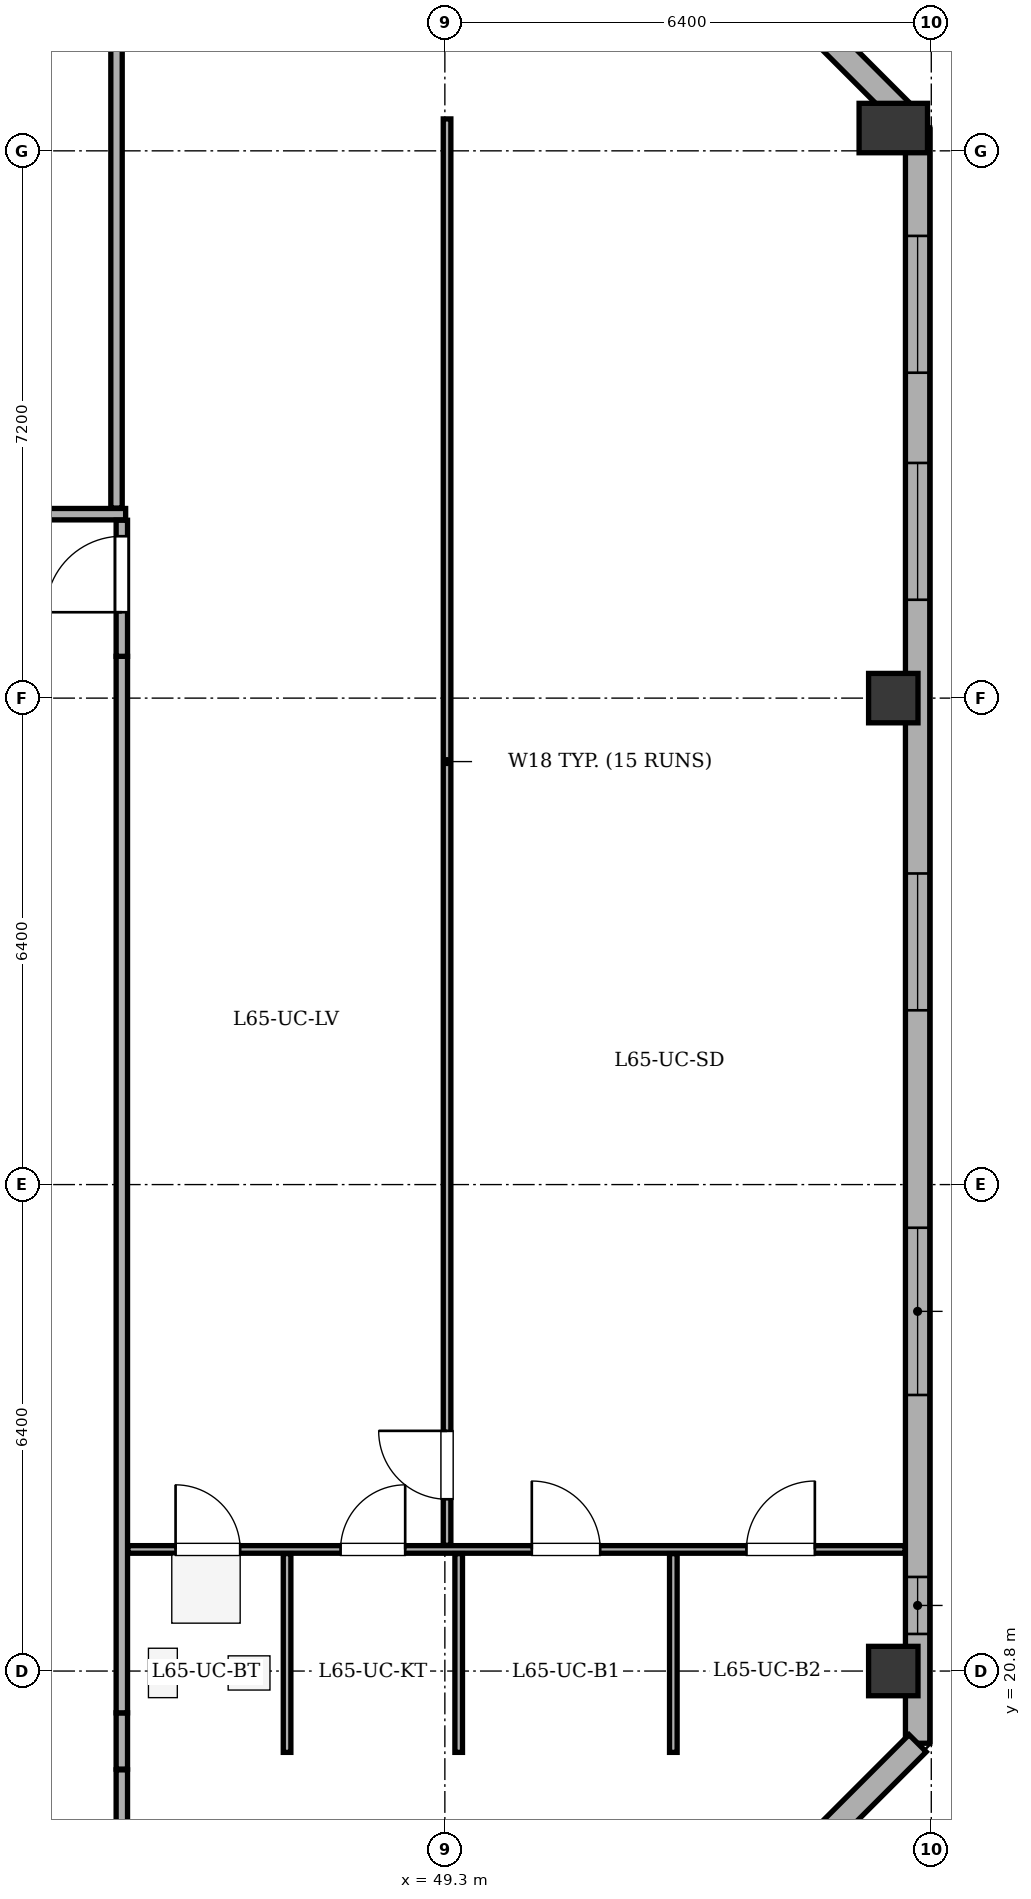
"""IFC4 building model, lengths in metres.
Left out: names, types, materials, properties, quantities, classifications, styles, units other than length and angle.
Written with IfcOpenShell. Run it as: python <this file> out.ifc"""

import sys

from ifc_helpers import new_model, si_unit, direction, frame, frame_2d, origin, origin_2d, place, context, subcontext, project, spatial, rectangle, extrude, element, fill, save


model = new_model("IFC4")
c1 = context("Model", 3, precision=1e-05, world=origin(), true_north=direction((0.0, 1.0)))
c2 = subcontext(c1, "Body", "Model", "MODEL_VIEW")
j1 = project(units=[si_unit("LENGTHUNIT", "METRE"), si_unit("PLANEANGLEUNIT", "RADIAN")], contexts=[c1])
p1 = place(None, origin())
s1 = spatial("IfcSite", under=j1, at=p1, CompositionType="ELEMENT")
p2 = place(p1, origin())
s2 = spatial("IfcBuilding", under=s1, at=p2, CompositionType="ELEMENT")
p3 = place(p2, frame((0.0, 0.0, 248.3)))
s3 = spatial("IfcBuildingStorey", under=s2, at=p3, CompositionType="ELEMENT", Elevation=248.3)
for number, where, z_axis, x_axis in (
    (1, (55.2, 20.8, 0.0), (0.0, 0.0, 1.0), (1.0, 0.0, 0.0)),
    (2, (55.2, 33.6, 0.0), (0.0, 0.0, 1.0), (1.0, 0.0, 0.0)),
):
    element("IfcColumn", number, at=place(p3, frame(where, z_axis=z_axis, x_axis=x_axis)), inside=s3, PredefinedType="COLUMN", context=c2, shape_type="SweptSolid", body=[
        extrude(rectangle(XDim=0.65, YDim=0.65, at=origin_2d()), origin(), (0.0, 0.0, 1.0), 3.4),
    ])
p4 = place(p3, frame((55.2, 41.1, 0.0), z_axis=(0.0, 0.0, 1.0), x_axis=(1.0, 0.0, 0.0)))
e3 = element("IfcColumn", 3, at=p4, inside=s3, PredefinedType="COLUMN", context=c2, shape_type="SweptSolid", body=[
    extrude(rectangle(XDim=0.65, YDim=0.9, at=origin_2d()), origin(), (0.0, 0.0, 1.0), 3.4),
])
p5 = place(p3, frame((51.7, 44.92, 0.0), z_axis=(0.0, 0.0, 1.0), x_axis=(0.70712937715, -0.707084184501, 0.0)))
e4 = element("IfcWall", 4, at=p5, inside=s3, PredefinedType="STANDARD", context=c2, shape_type="SweptSolid", body=[
    extrude(rectangle(XDim=5.402, YDim=0.32, at=frame_2d((2.701, 0.0))), origin(), (0.0, 0.0, 1.0), 2.725),
])
p6 = place(p5, frame((2.001, 0.0, 0.75)))
e5 = element("IfcOpeningElement", 5, at=p6, cuts=e4, PredefinedType="OPENING", context=c2, shape_type="SweptSolid", body=[
    extrude(rectangle(XDim=1.4, YDim=1.65, at=frame_2d((0.7, 0.825))), frame((0.0, 0.17, 0.0), z_axis=(0.0, -1.0, 0.0), x_axis=(1.0, 0.0, 0.0)), (0.0, 0.0, 1.0), 0.34),
])
p7 = place(p3, frame((55.52, 41.1, 0.0), z_axis=(0.0, 0.0, 1.0), x_axis=(0.0, -1.0, 0.0)))
e6 = element("IfcWall", 6, at=p7, inside=s3, PredefinedType="STANDARD", context=c2, shape_type="SweptSolid", body=[
    extrude(rectangle(XDim=21.25, YDim=0.32, at=frame_2d((10.625, 0.0))), origin(), (0.0, 0.0, 1.0), 2.725),
])
p8 = place(p7, frame((1.419, 0.0, 0.75)))
e7 = element("IfcOpeningElement", 7, at=p8, cuts=e6, PredefinedType="OPENING", context=c2, shape_type="SweptSolid", body=[
    extrude(rectangle(XDim=1.8, YDim=1.7, at=frame_2d((0.9, 0.85))), frame((0.0, 0.17, 0.0), z_axis=(0.0, -1.0, 0.0), x_axis=(1.0, 0.0, 0.0)), (0.0, 0.0, 1.0), 0.34),
])
p9 = place(p7, frame((4.406, 0.0, 0.75)))
e8 = element("IfcOpeningElement", 8, at=p9, cuts=e6, PredefinedType="OPENING", context=c2, shape_type="SweptSolid", body=[
    extrude(rectangle(XDim=1.8, YDim=1.7, at=frame_2d((0.9, 0.85))), frame((0.0, 0.17, 0.0), z_axis=(0.0, -1.0, 0.0), x_axis=(1.0, 0.0, 0.0)), (0.0, 0.0, 1.0), 0.34),
])
p10 = place(p7, frame((9.807, 0.0, 0.75)))
e9 = element("IfcOpeningElement", 9, at=p10, cuts=e6, PredefinedType="OPENING", context=c2, shape_type="SweptSolid", body=[
    extrude(rectangle(XDim=1.8, YDim=1.7, at=frame_2d((0.9, 0.85))), frame((0.0, 0.17, 0.0), z_axis=(0.0, -1.0, 0.0), x_axis=(1.0, 0.0, 0.0)), (0.0, 0.0, 1.0), 0.34),
])
p11 = place(p7, frame((14.468, 0.0, 0.75)))
e10 = element("IfcOpeningElement", 10, at=p11, cuts=e6, PredefinedType="OPENING", context=c2, shape_type="SweptSolid", body=[
    extrude(rectangle(XDim=2.2, YDim=1.7, at=frame_2d((1.1, 0.85))), frame((0.0, 0.17, 0.0), z_axis=(0.0, -1.0, 0.0), x_axis=(1.0, 0.0, 0.0)), (0.0, 0.0, 1.0), 0.34),
])
p12 = place(p7, frame((19.062, 0.0, 0.75)))
e11 = element("IfcOpeningElement", 11, at=p12, cuts=e6, PredefinedType="OPENING", context=c2, shape_type="SweptSolid", body=[
    extrude(rectangle(XDim=0.75, YDim=1.45, at=frame_2d((0.375, 0.725))), frame((0.0, 0.17, 0.0), z_axis=(0.0, -1.0, 0.0), x_axis=(1.0, 0.0, 0.0)), (0.0, 0.0, 1.0), 0.34),
])
p13 = place(p3, frame((55.52, 19.85, 0.0), z_axis=(0.0, 0.0, 1.0), x_axis=(-0.707106781187, -0.707106781187, 0.0)))
e12 = element("IfcWall", 12, at=p13, inside=s3, PredefinedType="STANDARD", context=c2, shape_type="SweptSolid", body=[
    extrude(rectangle(XDim=5.402, YDim=0.32, at=frame_2d((2.701, 0.0))), origin(), (0.0, 0.0, 1.0), 2.725),
])
p14 = place(p13, frame((2.001, 0.0, 0.75)))
e13 = element("IfcOpeningElement", 13, at=p14, cuts=e12, PredefinedType="OPENING", context=c2, shape_type="SweptSolid", body=[
    extrude(rectangle(XDim=1.4, YDim=1.65, at=frame_2d((0.7, 0.825))), frame((0.0, 0.17, 0.0), z_axis=(0.0, -1.0, 0.0), x_axis=(1.0, 0.0, 0.0)), (0.0, 0.0, 1.0), 0.34),
])
p15 = place(p3, frame((14.58, 36.02, 0.0), z_axis=(0.0, 0.0, 1.0), x_axis=(1.0, 0.0, 0.0)))
e14 = element("IfcWall", 14, at=p15, inside=s3, PredefinedType="PARTITIONING", context=c2, shape_type="SweptSolid", body=[
    extrude(rectangle(XDim=30.52, YDim=0.15, at=frame_2d((15.26, 0.0))), origin(), (0.0, 0.0, 1.0), 3.1),
])
p16 = place(p15, frame((6.585, 0.0, 0.0)))
e15 = element("IfcOpeningElement", 15, at=p16, cuts=e14, PredefinedType="OPENING", context=c2, shape_type="SweptSolid", body=[
    extrude(rectangle(XDim=1.0, YDim=2.1, at=frame_2d((0.5, 1.05))), frame((0.0, 0.085, 0.0), z_axis=(0.0, -1.0, 0.0), x_axis=(1.0, 0.0, 0.0)), (0.0, 0.0, 1.0), 0.17),
])
p17 = place(p15, frame((21.724, 0.0, 0.0)))
e16 = element("IfcOpeningElement", 16, at=p17, cuts=e14, PredefinedType="OPENING", context=c2, shape_type="SweptSolid", body=[
    extrude(rectangle(XDim=1.0, YDim=2.1, at=frame_2d((0.5, 1.05))), frame((0.0, 0.085, 0.0), z_axis=(0.0, -1.0, 0.0), x_axis=(1.0, 0.0, 0.0)), (0.0, 0.0, 1.0), 0.17),
])
p18 = place(p3, frame((44.98, 36.1, 0.0), z_axis=(0.0, 0.0, 1.0), x_axis=(0.0, 1.0, 0.0)))
e17 = element("IfcWall", 17, at=p18, inside=s3, PredefinedType="PARTITIONING", context=c2, shape_type="SweptSolid", body=[
    extrude(rectangle(XDim=8.655, YDim=0.15, at=frame_2d((4.327, 0.0))), origin(), (0.0, 0.0, 1.0), 2.725),
])
p19 = place(p3, frame((45.05, 19.5, 0.0), z_axis=(0.0, 0.0, 1.0), x_axis=(0.0, -1.0, 0.0)))
e18 = element("IfcWall", 18, at=p19, inside=s3, PredefinedType="PARTITIONING", context=c2, shape_type="SweptSolid", body=[
    extrude(rectangle(XDim=0.96, YDim=0.15, at=frame_2d((0.48, 0.0))), origin(), (0.0, 0.0, 1.0), 2.725),
])
p20 = place(p3, frame((45.05, 19.51, 0.0), z_axis=(0.0, 0.0, 1.0), x_axis=(0.0, 1.0, 0.0)))
e19 = element("IfcWall", 19, at=p20, inside=s3, PredefinedType="PARTITIONING", context=c2, shape_type="SweptSolid", body=[
    extrude(rectangle(XDim=0.74, YDim=0.15, at=frame_2d((0.37, 0.0))), origin(), (0.0, 0.0, 1.0), 2.725),
])
p21 = place(p3, frame((45.05, 20.25, 0.0), z_axis=(0.0, 0.0, 1.0), x_axis=(0.0, 1.0, 0.0)))
e20 = element("IfcWall", 20, at=p21, inside=s3, PredefinedType="PARTITIONING", context=c2, shape_type="SweptSolid", body=[
    extrude(rectangle(XDim=13.9, YDim=0.15, at=frame_2d((6.95, 0.0))), origin(), (0.0, 0.0, 1.0), 2.725),
])
p22 = place(p3, frame((45.05, 34.15, 0.0), z_axis=(0.0, 0.0, 1.0), x_axis=(0.0, 1.0, 0.0)))
e21 = element("IfcWall", 21, at=p22, inside=s3, PredefinedType="PARTITIONING", context=c2, shape_type="SweptSolid", body=[
    extrude(rectangle(XDim=1.79, YDim=0.15, at=frame_2d((0.895, 0.0))), origin(), (0.0, 0.0, 1.0), 2.725),
])
p23 = place(p22, frame((0.58, 0.0, 0.0)))
e22 = element("IfcOpeningElement", 22, at=p23, cuts=e21, PredefinedType="OPENING", context=c2, shape_type="SweptSolid", body=[
    extrude(rectangle(XDim=1.0, YDim=2.1, at=frame_2d((0.5, 1.05))), frame((0.0, 0.085, 0.0), z_axis=(0.0, -1.0, 0.0), x_axis=(1.0, 0.0, 0.0)), (0.0, 0.0, 1.0), 0.17),
])
p24 = place(p3, frame((45.13, 22.4, 0.0), z_axis=(0.0, 0.0, 1.0), x_axis=(1.0, 0.0, 0.0)))
e23 = element("IfcWall", 23, at=p24, inside=s3, PredefinedType="PARTITIONING", context=c2, shape_type="SweptSolid", body=[
    extrude(rectangle(XDim=10.225, YDim=0.1, at=frame_2d((5.113, 0.0))), origin(), (0.0, 0.0, 1.0), 3.1),
])
p25 = place(p24, frame((0.627, 0.0, 0.0)))
e24 = element("IfcOpeningElement", 24, at=p25, cuts=e23, PredefinedType="OPENING", context=c2, shape_type="SweptSolid", body=[
    extrude(rectangle(XDim=0.85, YDim=2.05, at=frame_2d((0.425, 1.025))), frame((0.0, 0.06, 0.0), z_axis=(0.0, -1.0, 0.0), x_axis=(1.0, 0.0, 0.0)), (0.0, 0.0, 1.0), 0.12),
])
p26 = place(p24, frame((2.798, 0.0, 0.0)))
e25 = element("IfcOpeningElement", 25, at=p26, cuts=e23, PredefinedType="OPENING", context=c2, shape_type="SweptSolid", body=[
    extrude(rectangle(XDim=0.85, YDim=2.05, at=frame_2d((0.425, 1.025))), frame((0.0, 0.06, 0.0), z_axis=(0.0, -1.0, 0.0), x_axis=(1.0, 0.0, 0.0)), (0.0, 0.0, 1.0), 0.12),
])
p27 = place(p24, frame((5.314, 0.0, 0.0)))
e26 = element("IfcOpeningElement", 26, at=p27, cuts=e23, PredefinedType="OPENING", context=c2, shape_type="SweptSolid", body=[
    extrude(rectangle(XDim=0.9, YDim=2.05, at=frame_2d((0.45, 1.025))), frame((0.0, 0.06, 0.0), z_axis=(0.0, -1.0, 0.0), x_axis=(1.0, 0.0, 0.0)), (0.0, 0.0, 1.0), 0.12),
])
p28 = place(p24, frame((8.138, 0.0, 0.0)))
e27 = element("IfcOpeningElement", 27, at=p28, cuts=e23, PredefinedType="OPENING", context=c2, shape_type="SweptSolid", body=[
    extrude(rectangle(XDim=0.9, YDim=2.05, at=frame_2d((0.45, 1.025))), frame((0.0, 0.06, 0.0), z_axis=(0.0, -1.0, 0.0), x_axis=(1.0, 0.0, 0.0)), (0.0, 0.0, 1.0), 0.12),
])
p29 = place(p3, frame((49.329, 22.455, 0.0), z_axis=(0.0, 0.0, 1.0), x_axis=(0.0, 1.0, 0.0)))
e28 = element("IfcWall", 28, at=p29, inside=s3, PredefinedType="PARTITIONING", context=c2, shape_type="SweptSolid", body=[
    extrude(rectangle(XDim=18.765, YDim=0.1, at=frame_2d((9.382, 0.0))), origin(), (0.0, 0.0, 1.0), 2.725),
])
p30 = place(p29, frame((0.605, 0.0, 0.0)))
e29 = element("IfcOpeningElement", 29, at=p30, cuts=e28, PredefinedType="OPENING", context=c2, shape_type="SweptSolid", body=[
    extrude(rectangle(XDim=0.9, YDim=2.05, at=frame_2d((0.45, 1.025))), frame((0.0, 0.06, 0.0), z_axis=(0.0, -1.0, 0.0), x_axis=(1.0, 0.0, 0.0)), (0.0, 0.0, 1.0), 0.12),
])
for number, where, z_axis, x_axis in (
    (30, (47.224, 19.73, 0.0), (0.0, 0.0, 1.0), (0.0, 1.0, 0.0)),
    (31, (49.482, 19.73, 0.0), (0.0, 0.0, 1.0), (0.0, 1.0, 0.0)),
):
    element("IfcWall", number, at=place(p3, frame(where, z_axis=z_axis, x_axis=x_axis)), inside=s3, PredefinedType="PARTITIONING", context=c2, shape_type="SweptSolid", body=[
        extrude(rectangle(XDim=2.615, YDim=0.1, at=frame_2d((1.308, 0.0))), origin(), (0.0, 0.0, 1.0), 2.725),
    ])
p31 = place(p3, frame((52.306, 19.73, 0.0), z_axis=(0.0, 0.0, 1.0), x_axis=(0.0, 1.0, 0.0)))
e32 = element("IfcWall", 32, at=p31, inside=s3, PredefinedType="PARTITIONING", context=c2, shape_type="SweptSolid", body=[
    extrude(rectangle(XDim=2.615, YDim=0.1, at=frame_2d((1.308, 0.0))), origin(), (0.0, 0.0, 1.0), 3.1),
])
p32 = place(p8, origin())
e33 = element("IfcWindow", 33, at=p32, inside=s3, PartitioningType="SINGLE_PANEL", PredefinedType="WINDOW", context=c2, shape_type="SweptSolid", body=[
    extrude(rectangle(XDim=1.8, YDim=1.7, at=frame_2d((0.9, 0.85))), frame((0.0, -0.01, 0.0), z_axis=(0.0, -1.0, 0.0), x_axis=(1.0, 0.0, 0.0)), (0.0, 0.0, 1.0), 0.06),
])
fill(e7, e33)
p33 = place(p9, origin())
e34 = element("IfcWindow", 34, at=p33, inside=s3, PartitioningType="SINGLE_PANEL", PredefinedType="WINDOW", context=c2, shape_type="SweptSolid", body=[
    extrude(rectangle(XDim=1.8, YDim=1.7, at=frame_2d((0.9, 0.85))), frame((0.0, -0.01, 0.0), z_axis=(0.0, -1.0, 0.0), x_axis=(1.0, 0.0, 0.0)), (0.0, 0.0, 1.0), 0.06),
])
fill(e8, e34)
p34 = place(p10, origin())
e35 = element("IfcWindow", 35, at=p34, inside=s3, PartitioningType="SINGLE_PANEL", PredefinedType="WINDOW", context=c2, shape_type="SweptSolid", body=[
    extrude(rectangle(XDim=1.8, YDim=1.7, at=frame_2d((0.9, 0.85))), frame((0.0, -0.01, 0.0), z_axis=(0.0, -1.0, 0.0), x_axis=(1.0, 0.0, 0.0)), (0.0, 0.0, 1.0), 0.06),
])
fill(e9, e35)
p35 = place(p11, origin())
e36 = element("IfcWindow", 36, at=p35, inside=s3, PartitioningType="SINGLE_PANEL", PredefinedType="WINDOW", context=c2, shape_type="SweptSolid", body=[
    extrude(rectangle(XDim=2.2, YDim=1.7, at=frame_2d((1.1, 0.85))), frame((0.0, -0.01, 0.0), z_axis=(0.0, -1.0, 0.0), x_axis=(1.0, 0.0, 0.0)), (0.0, 0.0, 1.0), 0.06),
])
fill(e10, e36)
p36 = place(p12, origin())
e37 = element("IfcWindow", 37, at=p36, inside=s3, PartitioningType="SINGLE_PANEL", PredefinedType="WINDOW", context=c2, shape_type="SweptSolid", body=[
    extrude(rectangle(XDim=0.75, YDim=1.45, at=frame_2d((0.375, 0.725))), frame((0.0, -0.01, 0.0), z_axis=(0.0, -1.0, 0.0), x_axis=(1.0, 0.0, 0.0)), (0.0, 0.0, 1.0), 0.06),
])
fill(e11, e37)
p37 = place(p23, origin())
e38 = element("IfcDoor", 38, at=p37, inside=s3, OperationType="SINGLE_SWING_LEFT", PredefinedType="DOOR", context=c2, shape_type="SweptSolid", body=[
    extrude(rectangle(XDim=1.0, YDim=2.1, at=frame_2d((0.5, 1.05))), frame((0.0, 0.025, 0.0), z_axis=(0.0, -1.0, 0.0), x_axis=(1.0, 0.0, 0.0)), (0.0, 0.0, 1.0), 0.05),
])
fill(e22, e38)
p38 = place(p30, origin())
e39 = element("IfcDoor", 39, at=p38, inside=s3, OperationType="SINGLE_SWING_RIGHT", PredefinedType="DOOR", context=c2, shape_type="SweptSolid", body=[
    extrude(rectangle(XDim=0.9, YDim=2.05, at=frame_2d((0.45, 1.025))), frame((0.0, 0.025, 0.0), z_axis=(0.0, -1.0, 0.0), x_axis=(1.0, 0.0, 0.0)), (0.0, 0.0, 1.0), 0.05),
])
fill(e29, e39)
p39 = place(p25, origin())
e40 = element("IfcDoor", 40, at=p39, inside=s3, OperationType="SINGLE_SWING_LEFT", PredefinedType="DOOR", context=c2, shape_type="SweptSolid", body=[
    extrude(rectangle(XDim=0.85, YDim=2.05, at=frame_2d((0.425, 1.025))), frame((0.0, 0.025, 0.0), z_axis=(0.0, -1.0, 0.0), x_axis=(1.0, 0.0, 0.0)), (0.0, 0.0, 1.0), 0.05),
])
fill(e24, e40)
p40 = place(p26, origin())
e41 = element("IfcDoor", 41, at=p40, inside=s3, OperationType="SINGLE_SWING_RIGHT", PredefinedType="DOOR", context=c2, shape_type="SweptSolid", body=[
    extrude(rectangle(XDim=0.85, YDim=2.05, at=frame_2d((0.425, 1.025))), frame((0.0, 0.025, 0.0), z_axis=(0.0, -1.0, 0.0), x_axis=(1.0, 0.0, 0.0)), (0.0, 0.0, 1.0), 0.05),
])
fill(e25, e41)
p41 = place(p27, origin())
e42 = element("IfcDoor", 42, at=p41, inside=s3, OperationType="SINGLE_SWING_LEFT", PredefinedType="DOOR", context=c2, shape_type="SweptSolid", body=[
    extrude(rectangle(XDim=0.9, YDim=2.05, at=frame_2d((0.45, 1.025))), frame((0.0, 0.025, 0.0), z_axis=(0.0, -1.0, 0.0), x_axis=(1.0, 0.0, 0.0)), (0.0, 0.0, 1.0), 0.05),
])
fill(e26, e42)
p42 = place(p28, origin())
e43 = element("IfcDoor", 43, at=p42, inside=s3, OperationType="SINGLE_SWING_RIGHT", PredefinedType="DOOR", context=c2, shape_type="SweptSolid", body=[
    extrude(rectangle(XDim=0.9, YDim=2.05, at=frame_2d((0.45, 1.025))), frame((0.0, 0.025, 0.0), z_axis=(0.0, -1.0, 0.0), x_axis=(1.0, 0.0, 0.0)), (0.0, 0.0, 1.0), 0.05),
])
fill(e27, e43)
save(model, sys.argv[1])
